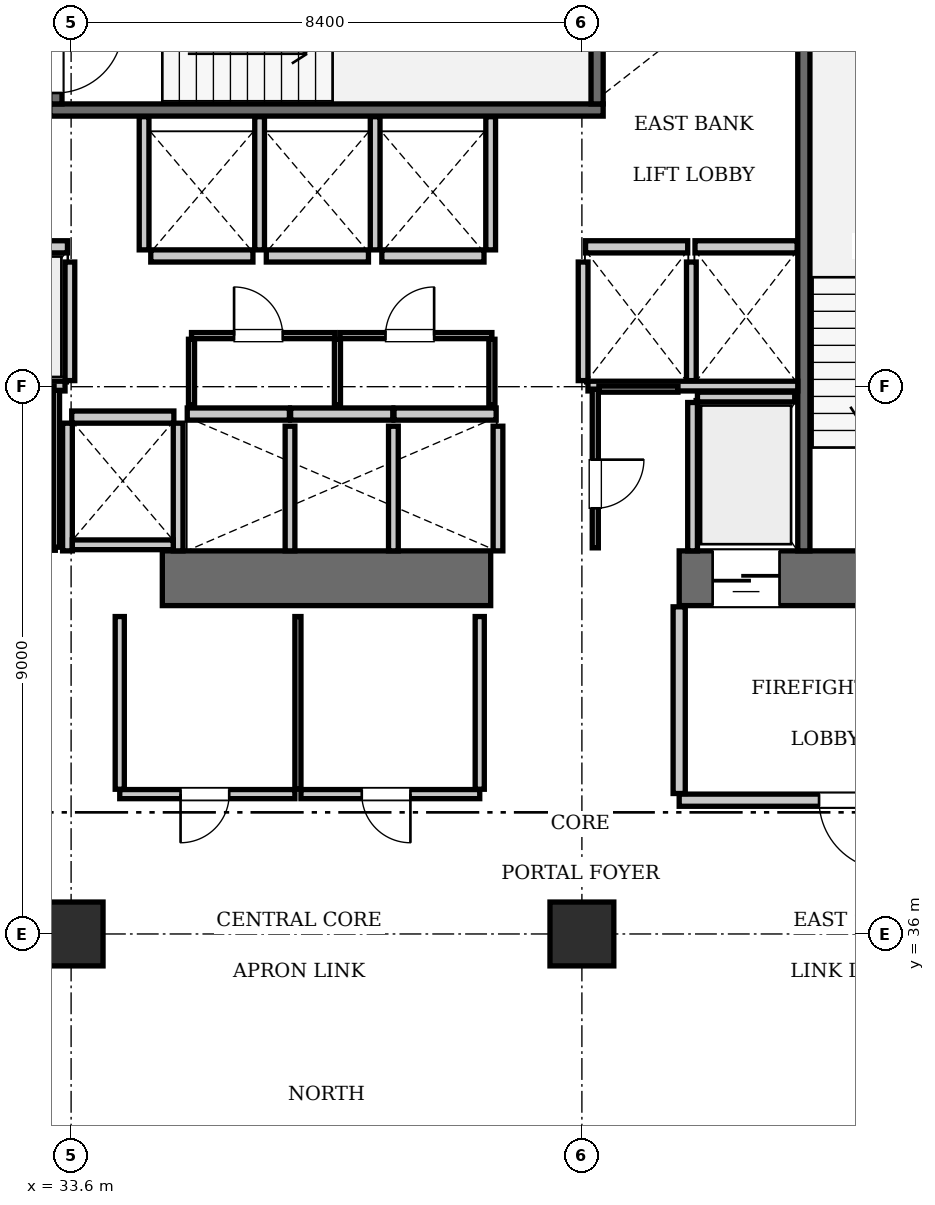
"""IFC4 building model, lengths in metres.
Left out: names, types, materials, properties, quantities, classifications, styles, units other than length and angle.
Written with IfcOpenShell. Run it as: python <this file> out.ifc"""

import sys

from ifc_helpers import new_model, si_unit, direction, frame, frame_2d, origin, origin_2d, place, context, subcontext, project, spatial, rectangle, extrude, element, fill, save


model = new_model("IFC4")
c1 = context("Model", 3, precision=1e-05, world=origin(), true_north=direction((0.0, 1.0)))
c2 = subcontext(c1, "Body", "Model", "MODEL_VIEW")
j1 = project(units=[si_unit("LENGTHUNIT", "METRE"), si_unit("PLANEANGLEUNIT", "RADIAN")], contexts=[c1])
p1 = place(None, origin())
s1 = spatial("IfcSite", under=j1, at=p1, CompositionType="ELEMENT")
p2 = place(p1, origin())
s2 = spatial("IfcBuilding", under=s1, at=p2, CompositionType="ELEMENT")
p3 = place(p2, frame((0.0, 0.0, 84.7)))
s3 = spatial("IfcBuildingStorey", under=s2, at=p3, CompositionType="ELEMENT", Elevation=84.7)
p4 = place(p3, frame((35.1, 41.85, 0.0), z_axis=(0.0, 0.0, 1.0), x_axis=(1.0, 0.0, 0.0)))
e1 = element("IfcWall", 1, at=p4, inside=s3, PredefinedType="SHEAR", context=c2, shape_type="SweptSolid", body=[
    extrude(rectangle(XDim=5.4, YDim=0.9, at=frame_2d((2.7, 0.0))), origin(), (0.0, 0.0, 1.0), 3.85),
])
p5 = place(p3, frame((43.6, 41.85, 0.0), z_axis=(0.0, 0.0, 1.0), x_axis=(1.0, 0.0, 0.0)))
e2 = element("IfcWall", 2, at=p5, inside=s3, PredefinedType="SHEAR", context=c2, shape_type="SweptSolid", body=[
    extrude(rectangle(XDim=6.8, YDim=0.9, at=frame_2d((3.4, 0.0))), origin(), (0.0, 0.0, 1.0), 3.85),
])
p6 = place(p5, frame((3.9, 0.0, 0.0)))
e3 = element("IfcOpeningElement", 3, at=p6, cuts=e2, PredefinedType="OPENING", context=c2, shape_type="SweptSolid", body=[
    extrude(rectangle(XDim=1.15, YDim=2.15, at=frame_2d((0.575, 1.075))), frame((0.0, 0.46, 0.0), z_axis=(0.0, -1.0, 0.0), x_axis=(1.0, 0.0, 0.0)), (0.0, 0.0, 1.0), 0.92),
])
p7 = place(p5, frame((0.55, 0.0, 0.0)))
e4 = element("IfcOpeningElement", 4, at=p7, cuts=e2, PredefinedType="OPENING", context=c2, shape_type="SweptSolid", body=[
    extrude(rectangle(XDim=1.1, YDim=2.2, at=frame_2d((0.55, 1.1))), frame((0.0, 0.46, 0.0), z_axis=(0.0, -1.0, 0.0), x_axis=(1.0, 0.0, 0.0)), (0.0, 0.0, 1.0), 0.92),
])
for number, where, z_axis, x_axis in (
    (5, (33.6, 36.0, 0.0), (0.0, 0.0, 1.0), (1.0, 0.0, 0.0)),
    (6, (42.0, 36.0, 0.0), (0.0, 0.0, 1.0), (1.0, 0.0, 0.0)),
):
    element("IfcColumn", number, at=place(p3, frame(where, z_axis=z_axis, x_axis=x_axis)), inside=s3, PredefinedType="COLUMN", context=c2, shape_type="SweptSolid", body=[
        extrude(rectangle(XDim=1.05, YDim=1.05, at=origin_2d()), origin(), (0.0, 0.0, 1.0), 3.85),
    ])
p8 = place(p3, frame((33.25, 49.55, 0.0), z_axis=(0.0, 0.0, 1.0), x_axis=(1.0, 0.0, 0.0)))
e7 = element("IfcWall", 7, at=p8, inside=s3, PredefinedType="SOLIDWALL", context=c2, shape_type="SweptSolid", body=[
    extrude(rectangle(XDim=9.1, YDim=0.2, at=frame_2d((4.55, 0.0))), origin(), (0.0, 0.0, 1.0), 3.61),
])
p9 = place(p3, frame((42.25, 49.65, 0.0), z_axis=(0.0, 0.0, 1.0), x_axis=(0.0, 1.0, 0.0)))
e8 = element("IfcWall", 8, at=p9, inside=s3, PredefinedType="SOLIDWALL", context=c2, shape_type="SweptSolid", body=[
    extrude(rectangle(XDim=3.45, YDim=0.2, at=frame_2d((1.725, 0.0))), origin(), (0.0, 0.0, 1.0), 3.61),
])
p10 = place(p3, frame((33.35, 49.65, 0.0), z_axis=(0.0, 0.0, 1.0), x_axis=(0.0, 1.0, 0.0)))
e9 = element("IfcWall", 9, at=p10, inside=s3, PredefinedType="SOLIDWALL", context=c2, shape_type="SweptSolid", body=[
    extrude(rectangle(XDim=3.45, YDim=0.2, at=frame_2d((1.725, 0.0))), origin(), (0.0, 0.0, 1.0), 3.61),
])
p11 = place(p10, frame((0.18, 0.0, 0.0)))
e10 = element("IfcOpeningElement", 10, at=p11, cuts=e9, PredefinedType="OPENING", context=c2, shape_type="SweptSolid", body=[
    extrude(rectangle(XDim=1.1, YDim=2.15, at=frame_2d((0.55, 1.075))), frame((0.0, 0.11, 0.0), z_axis=(0.0, -1.0, 0.0), x_axis=(1.0, 0.0, 0.0)), (0.0, 0.0, 1.0), 0.22),
])
p12 = place(p3, frame((45.65, 42.3, 0.0), z_axis=(0.0, 0.0, 1.0), x_axis=(0.0, 1.0, 0.0)))
e11 = element("IfcWall", 11, at=p12, inside=s3, PredefinedType="SOLIDWALL", context=c2, shape_type="SweptSolid", body=[
    extrude(rectangle(XDim=8.85, YDim=0.2, at=frame_2d((4.425, 0.0))), origin(), (0.0, 0.0, 1.0), 3.61),
])
p13 = place(p3, frame((31.86, 47.3, 0.0), z_axis=(0.0, 0.0, 1.0), x_axis=(1.0, 0.0, 0.0)))
e12 = element("IfcWall", 12, at=p13, inside=s3, PredefinedType="SOLIDWALL", context=c2, shape_type="SweptSolid", body=[
    extrude(rectangle(XDim=1.68, YDim=0.2, at=frame_2d((0.84, 0.0))), origin(), (0.0, 0.0, 1.0), 3.61),
])
p14 = place(p13, frame((0.34, 0.0, 0.0)))
e13 = element("IfcOpeningElement", 13, at=p14, cuts=e12, PredefinedType="OPENING", context=c2, shape_type="SweptSolid", body=[
    extrude(rectangle(XDim=1.0, YDim=2.15, at=frame_2d((0.5, 1.075))), frame((0.0, 0.11, 0.0), z_axis=(0.0, -1.0, 0.0), x_axis=(1.0, 0.0, 0.0)), (0.0, 0.0, 1.0), 0.22),
])
for number, where, z_axis, x_axis in (
    (14, (42.06, 47.3, 0.0), (0.0, 0.0, 1.0), (1.0, 0.0, 0.0)),
    (15, (43.86, 47.3, 0.0), (0.0, 0.0, 1.0), (1.0, 0.0, 0.0)),
    (16, (35.51, 44.55, 0.0), (0.0, 0.0, 1.0), (1.0, 0.0, 0.0)),
    (17, (37.21, 44.55, 0.0), (0.0, 0.0, 1.0), (1.0, 0.0, 0.0)),
):
    element("IfcWall", number, at=place(p3, frame(where, z_axis=z_axis, x_axis=x_axis)), inside=s3, PredefinedType="SOLIDWALL", context=c2, shape_type="SweptSolid", body=[
        extrude(rectangle(XDim=1.68, YDim=0.2, at=frame_2d((0.84, 0.0))), origin(), (0.0, 0.0, 1.0), 3.61),
    ])
for number, where, z_axis, x_axis in (
    (18, (38.91, 44.55, 0.0), (0.0, 0.0, 1.0), (1.0, 0.0, 0.0)),
    (19, (34.91, 47.15, 0.0), (0.0, 0.0, 1.0), (1.0, 0.0, 0.0)),
):
    element("IfcWall", number, at=place(p3, frame(where, z_axis=z_axis, x_axis=x_axis)), inside=s3, PredefinedType="SOLIDWALL", context=c2, shape_type="SweptSolid", body=[
        extrude(rectangle(XDim=1.68, YDim=0.2, at=frame_2d((0.84, 0.0))), origin(), (0.0, 0.0, 1.0), 3.61),
    ])
for number, where, z_axis, x_axis in (
    (20, (36.81, 47.15, 0.0), (0.0, 0.0, 1.0), (1.0, 0.0, 0.0)),
    (21, (38.71, 47.15, 0.0), (0.0, 0.0, 1.0), (1.0, 0.0, 0.0)),
    (22, (33.61, 44.5, 0.0), (0.0, 0.0, 1.0), (1.0, 0.0, 0.0)),
):
    element("IfcWall", number, at=place(p3, frame(where, z_axis=z_axis, x_axis=x_axis)), inside=s3, PredefinedType="SOLIDWALL", context=c2, shape_type="SweptSolid", body=[
        extrude(rectangle(XDim=1.68, YDim=0.2, at=frame_2d((0.84, 0.0))), origin(), (0.0, 0.0, 1.0), 3.61),
    ])
p15 = place(p3, frame((43.9, 44.83, 0.0), z_axis=(0.0, 0.0, 1.0), x_axis=(1.0, 0.0, 0.0)))
e23 = element("IfcWall", 23, at=p15, inside=s3, PredefinedType="SOLIDWALL", context=c2, shape_type="SweptSolid", body=[
    extrude(rectangle(XDim=1.6, YDim=0.16, at=frame_2d((0.8, 0.0))), origin(), (0.0, 0.0, 1.0), 3.61),
])
p16 = place(p3, frame((43.82, 42.3, 0.0), z_axis=(0.0, 0.0, 1.0), x_axis=(0.0, 1.0, 0.0)))
e24 = element("IfcWall", 24, at=p16, inside=s3, PredefinedType="SOLIDWALL", context=c2, shape_type="SweptSolid", body=[
    extrude(rectangle(XDim=2.44, YDim=0.16, at=frame_2d((1.22, 0.0))), origin(), (0.0, 0.0, 1.0), 3.61),
])
p17 = place(p3, frame((33.58, 45.1, 0.0), z_axis=(0.0, 0.0, 1.0), x_axis=(0.0, 1.0, 0.0)))
e25 = element("IfcWall", 25, at=p17, inside=s3, PredefinedType="SOLIDWALL", context=c2, shape_type="SweptSolid", body=[
    extrude(rectangle(XDim=1.95, YDim=0.16, at=frame_2d((0.975, 0.0))), origin(), (0.0, 0.0, 1.0), 3.61),
])
p18 = place(p3, frame((30.05, 45.01, 0.0), z_axis=(0.0, 0.0, 1.0), x_axis=(1.0, 0.0, 0.0)))
e26 = element("IfcWall", 26, at=p18, inside=s3, PredefinedType="SOLIDWALL", context=c2, shape_type="SweptSolid", body=[
    extrude(rectangle(XDim=3.45, YDim=0.16, at=frame_2d((1.725, 0.0))), origin(), (0.0, 0.0, 1.0), 3.61),
])
for number, where, z_axis, x_axis in (
    (27, (42.02, 45.1, 0.0), (0.0, 0.0, 1.0), (0.0, 1.0, 0.0)),
    (28, (43.8, 45.1, 0.0), (0.0, 0.0, 1.0), (0.0, 1.0, 0.0)),
):
    element("IfcWall", number, at=place(p3, frame(where, z_axis=z_axis, x_axis=x_axis)), inside=s3, PredefinedType="SOLIDWALL", context=c2, shape_type="SweptSolid", body=[
        extrude(rectangle(XDim=1.95, YDim=0.16, at=frame_2d((0.975, 0.0))), origin(), (0.0, 0.0, 1.0), 3.61),
    ])
p19 = place(p3, frame((42.1, 45.01, 0.0), z_axis=(0.0, 0.0, 1.0), x_axis=(1.0, 0.0, 0.0)))
e29 = element("IfcWall", 29, at=p19, inside=s3, PredefinedType="SOLIDWALL", context=c2, shape_type="SweptSolid", body=[
    extrude(rectangle(XDim=3.45, YDim=0.16, at=frame_2d((1.725, 0.0))), origin(), (0.0, 0.0, 1.0), 3.61),
])
for number, where, z_axis, x_axis in (
    (30, (37.2, 42.3, 0.0), (0.0, 0.0, 1.0), (0.0, 1.0, 0.0)),
    (31, (38.9, 42.3, 0.0), (0.0, 0.0, 1.0), (0.0, 1.0, 0.0)),
    (32, (40.62, 42.3, 0.0), (0.0, 0.0, 1.0), (0.0, 1.0, 0.0)),
):
    element("IfcWall", number, at=place(p3, frame(where, z_axis=z_axis, x_axis=x_axis)), inside=s3, PredefinedType="SOLIDWALL", context=c2, shape_type="SweptSolid", body=[
        extrude(rectangle(XDim=2.05, YDim=0.16, at=frame_2d((1.025, 0.0))), origin(), (0.0, 0.0, 1.0), 3.61),
    ])
for number, where, z_axis, x_axis in (
    (33, (34.8, 47.25, 0.0), (0.0, 0.0, 1.0), (0.0, 1.0, 0.0)),
    (34, (36.7, 47.25, 0.0), (0.0, 0.0, 1.0), (0.0, 1.0, 0.0)),
    (35, (38.6, 47.25, 0.0), (0.0, 0.0, 1.0), (0.0, 1.0, 0.0)),
    (36, (40.5, 47.25, 0.0), (0.0, 0.0, 1.0), (0.0, 1.0, 0.0)),
):
    element("IfcWall", number, at=place(p3, frame(where, z_axis=z_axis, x_axis=x_axis)), inside=s3, PredefinedType="SOLIDWALL", context=c2, shape_type="SweptSolid", body=[
        extrude(rectangle(XDim=2.19, YDim=0.16, at=frame_2d((1.095, 0.0))), origin(), (0.0, 0.0, 1.0), 3.61),
    ])
for number, where, z_axis, x_axis in (
    (37, (33.54, 42.3, 0.0), (0.0, 0.0, 1.0), (0.0, 1.0, 0.0)),
    (38, (35.36, 42.3, 0.0), (0.0, 0.0, 1.0), (0.0, 1.0, 0.0)),
):
    element("IfcWall", number, at=place(p3, frame(where, z_axis=z_axis, x_axis=x_axis)), inside=s3, PredefinedType="SOLIDWALL", context=c2, shape_type="SweptSolid", body=[
        extrude(rectangle(XDim=2.1, YDim=0.16, at=frame_2d((1.05, 0.0))), origin(), (0.0, 0.0, 1.0), 3.61),
    ])
p20 = place(p3, frame((33.62, 42.4, 0.0), z_axis=(0.0, 0.0, 1.0), x_axis=(1.0, 0.0, 0.0)))
e39 = element("IfcWall", 39, at=p20, inside=s3, PredefinedType="SOLIDWALL", context=c2, shape_type="SweptSolid", body=[
    extrude(rectangle(XDim=1.66, YDim=0.16, at=frame_2d((0.83, 0.0))), origin(), (0.0, 0.0, 1.0), 3.61),
])
p21 = place(p3, frame((43.6, 38.2, 0.0), z_axis=(0.0, 0.0, 1.0), x_axis=(1.0, 0.0, 0.0)))
e40 = element("IfcWall", 40, at=p21, inside=s3, PredefinedType="PARTITIONING", context=c2, shape_type="SweptSolid", body=[
    extrude(rectangle(XDim=5.8, YDim=0.2, at=frame_2d((2.9, 0.0))), origin(), (0.0, 0.0, 1.0), 3.61),
])
p22 = place(p21, frame((2.3, 0.0, 0.0)))
e41 = element("IfcOpeningElement", 41, at=p22, cuts=e40, PredefinedType="OPENING", context=c2, shape_type="SweptSolid", body=[
    extrude(rectangle(XDim=1.15, YDim=2.15, at=frame_2d((0.575, 1.075))), frame((0.0, 0.11, 0.0), z_axis=(0.0, -1.0, 0.0), x_axis=(1.0, 0.0, 0.0)), (0.0, 0.0, 1.0), 0.22),
])
p23 = place(p3, frame((43.6, 38.31, 0.0), z_axis=(0.0, 0.0, 1.0), x_axis=(0.0, 1.0, 0.0)))
e42 = element("IfcWall", 42, at=p23, inside=s3, PredefinedType="PARTITIONING", context=c2, shape_type="SweptSolid", body=[
    extrude(rectangle(XDim=3.07, YDim=0.2, at=frame_2d((1.535, 0.0))), origin(), (0.0, 0.0, 1.0), 3.61),
])
p24 = place(p3, frame((32.02, 42.36, 0.0), z_axis=(0.0, 0.0, 1.0), x_axis=(1.0, 0.0, 0.0)))
e43 = element("IfcWall", 43, at=p24, inside=s3, PredefinedType="PARTITIONING", context=c2, shape_type="SweptSolid", body=[
    extrude(rectangle(XDim=1.32, YDim=0.1, at=frame_2d((0.66, 0.0))), origin(), (0.0, 0.0, 1.0), 3.61),
])
p25 = place(p24, frame((0.24, 0.0, 0.0)))
e44 = element("IfcOpeningElement", 44, at=p25, cuts=e43, PredefinedType="OPENING", context=c2, shape_type="SweptSolid", body=[
    extrude(rectangle(XDim=0.8, YDim=2.05, at=frame_2d((0.4, 1.025))), frame((0.0, 0.06, 0.0), z_axis=(0.0, -1.0, 0.0), x_axis=(1.0, 0.0, 0.0)), (0.0, 0.0, 1.0), 0.12),
])
p26 = place(p3, frame((31.84, 44.96, 0.0), z_axis=(0.0, 0.0, 1.0), x_axis=(1.0, 0.0, 0.0)))
e45 = element("IfcWall", 45, at=p26, inside=s3, PredefinedType="PARTITIONING", context=c2, shape_type="SweptSolid", body=[
    extrude(rectangle(XDim=1.48, YDim=0.1, at=frame_2d((0.74, 0.0))), origin(), (0.0, 0.0, 1.0), 3.61),
])
p27 = place(p3, frame((33.36, 42.36, 0.0), z_axis=(0.0, 0.0, 1.0), x_axis=(0.0, 1.0, 0.0)))
e46 = element("IfcWall", 46, at=p27, inside=s3, PredefinedType="PARTITIONING", context=c2, shape_type="SweptSolid", body=[
    extrude(rectangle(XDim=2.58, YDim=0.1, at=frame_2d((1.29, 0.0))), origin(), (0.0, 0.0, 1.0), 3.61),
])
p28 = place(p3, frame((35.58, 45.84, 0.0), z_axis=(0.0, 0.0, 1.0), x_axis=(1.0, 0.0, 0.0)))
e47 = element("IfcWall", 47, at=p28, inside=s3, PredefinedType="PARTITIONING", context=c2, shape_type="SweptSolid", body=[
    extrude(rectangle(XDim=2.36, YDim=0.1, at=frame_2d((1.18, 0.0))), origin(), (0.0, 0.0, 1.0), 3.61),
])
p29 = place(p28, frame((0.7, 0.0, 0.0)))
e48 = element("IfcOpeningElement", 48, at=p29, cuts=e47, PredefinedType="OPENING", context=c2, shape_type="SweptSolid", body=[
    extrude(rectangle(XDim=0.8, YDim=2.05, at=frame_2d((0.4, 1.025))), frame((0.0, 0.06, 0.0), z_axis=(0.0, -1.0, 0.0), x_axis=(1.0, 0.0, 0.0)), (0.0, 0.0, 1.0), 0.12),
])
p30 = place(p3, frame((38.02, 45.84, 0.0), z_axis=(0.0, 0.0, 1.0), x_axis=(1.0, 0.0, 0.0)))
e49 = element("IfcWall", 49, at=p30, inside=s3, PredefinedType="PARTITIONING", context=c2, shape_type="SweptSolid", body=[
    extrude(rectangle(XDim=2.5, YDim=0.1, at=frame_2d((1.25, 0.0))), origin(), (0.0, 0.0, 1.0), 3.61),
])
p31 = place(p30, frame((0.75, 0.0, 0.0)))
e50 = element("IfcOpeningElement", 50, at=p31, cuts=e49, PredefinedType="OPENING", context=c2, shape_type="SweptSolid", body=[
    extrude(rectangle(XDim=0.8, YDim=2.05, at=frame_2d((0.4, 1.025))), frame((0.0, 0.06, 0.0), z_axis=(0.0, -1.0, 0.0), x_axis=(1.0, 0.0, 0.0)), (0.0, 0.0, 1.0), 0.12),
])
for number, where, z_axis, x_axis in (
    (51, (35.58, 44.7, 0.0), (0.0, 0.0, 1.0), (0.0, 1.0, 0.0)),
    (52, (37.98, 44.7, 0.0), (0.0, 0.0, 1.0), (0.0, 1.0, 0.0)),
    (53, (40.52, 44.7, 0.0), (0.0, 0.0, 1.0), (0.0, 1.0, 0.0)),
):
    element("IfcWall", number, at=place(p3, frame(where, z_axis=z_axis, x_axis=x_axis)), inside=s3, PredefinedType="PARTITIONING", context=c2, shape_type="SweptSolid", body=[
        extrude(rectangle(XDim=1.08, YDim=0.1, at=frame_2d((0.54, 0.0))), origin(), (0.0, 0.0, 1.0), 3.61),
    ])
p32 = place(p3, frame((42.22, 42.35, 0.0), z_axis=(0.0, 0.0, 1.0), x_axis=(0.0, 1.0, 0.0)))
e54 = element("IfcWall", 54, at=p32, inside=s3, PredefinedType="PARTITIONING", context=c2, shape_type="SweptSolid", body=[
    extrude(rectangle(XDim=2.61, YDim=0.1, at=frame_2d((1.305, 0.0))), origin(), (0.0, 0.0, 1.0), 3.61),
])
p33 = place(p32, frame((0.65, 0.0, 0.0)))
e55 = element("IfcOpeningElement", 55, at=p33, cuts=e54, PredefinedType="OPENING", context=c2, shape_type="SweptSolid", body=[
    extrude(rectangle(XDim=0.8, YDim=2.05, at=frame_2d((0.4, 1.025))), frame((0.0, 0.06, 0.0), z_axis=(0.0, -1.0, 0.0), x_axis=(1.0, 0.0, 0.0)), (0.0, 0.0, 1.0), 0.12),
])
p34 = place(p3, frame((42.28, 44.96, 0.0), z_axis=(0.0, 0.0, 1.0), x_axis=(1.0, 0.0, 0.0)))
e56 = element("IfcWall", 56, at=p34, inside=s3, PredefinedType="PARTITIONING", context=c2, shape_type="SweptSolid", body=[
    extrude(rectangle(XDim=1.3, YDim=0.1, at=frame_2d((0.65, 0.0))), origin(), (0.0, 0.0, 1.0), 3.61),
])
p35 = place(p3, frame((34.4, 38.3, 0.0), z_axis=(0.0, 0.0, 1.0), x_axis=(1.0, 0.0, 0.0)))
e57 = element("IfcWall", 57, at=p35, inside=s3, PredefinedType="PARTITIONING", context=c2, shape_type="SweptSolid", body=[
    extrude(rectangle(XDim=2.88, YDim=0.15, at=frame_2d((1.44, 0.0))), origin(), (0.0, 0.0, 1.0), 3.61),
])
p36 = place(p35, frame((1.0, 0.0, 0.0)))
e58 = element("IfcOpeningElement", 58, at=p36, cuts=e57, PredefinedType="OPENING", context=c2, shape_type="SweptSolid", body=[
    extrude(rectangle(XDim=0.8, YDim=2.05, at=frame_2d((0.4, 1.025))), frame((0.0, 0.085, 0.0), z_axis=(0.0, -1.0, 0.0), x_axis=(1.0, 0.0, 0.0)), (0.0, 0.0, 1.0), 0.17),
])
p37 = place(p3, frame((37.38, 38.3, 0.0), z_axis=(0.0, 0.0, 1.0), x_axis=(1.0, 0.0, 0.0)))
e59 = element("IfcWall", 59, at=p37, inside=s3, PredefinedType="PARTITIONING", context=c2, shape_type="SweptSolid", body=[
    extrude(rectangle(XDim=2.94, YDim=0.15, at=frame_2d((1.47, 0.0))), origin(), (0.0, 0.0, 1.0), 3.61),
])
p38 = place(p37, frame((1.0, 0.0, 0.0)))
e60 = element("IfcOpeningElement", 60, at=p38, cuts=e59, PredefinedType="OPENING", context=c2, shape_type="SweptSolid", body=[
    extrude(rectangle(XDim=0.8, YDim=2.05, at=frame_2d((0.4, 1.025))), frame((0.0, 0.085, 0.0), z_axis=(0.0, -1.0, 0.0), x_axis=(1.0, 0.0, 0.0)), (0.0, 0.0, 1.0), 0.17),
])
p39 = place(p3, frame((34.4, 38.38, 0.0), z_axis=(0.0, 0.0, 1.0), x_axis=(0.0, 1.0, 0.0)))
e61 = element("IfcWall", 61, at=p39, inside=s3, PredefinedType="PARTITIONING", context=c2, shape_type="SweptSolid", body=[
    extrude(rectangle(XDim=2.84, YDim=0.15, at=frame_2d((1.42, 0.0))), origin(), (0.0, 0.0, 1.0), 3.61),
])
p40 = place(p3, frame((37.33, 38.38, 0.0), z_axis=(0.0, 0.0, 1.0), x_axis=(0.0, 1.0, 0.0)))
e62 = element("IfcWall", 62, at=p40, inside=s3, PredefinedType="PARTITIONING", context=c2, shape_type="SweptSolid", body=[
    extrude(rectangle(XDim=2.84, YDim=0.1, at=frame_2d((1.42, 0.0))), origin(), (0.0, 0.0, 1.0), 3.61),
])
p41 = place(p3, frame((40.32, 38.38, 0.0), z_axis=(0.0, 0.0, 1.0), x_axis=(0.0, 1.0, 0.0)))
e63 = element("IfcWall", 63, at=p41, inside=s3, PredefinedType="PARTITIONING", context=c2, shape_type="SweptSolid", body=[
    extrude(rectangle(XDim=2.84, YDim=0.15, at=frame_2d((1.42, 0.0))), origin(), (0.0, 0.0, 1.0), 3.61),
])
p42 = place(p11, frame((1.1, 0.0, 0.0), z_axis=(0.0, 0.0, 1.0), x_axis=(-1.0, 0.0, 0.0)))
e64 = element("IfcDoor", 64, at=p42, inside=s3, OperationType="SINGLE_SWING_LEFT", PredefinedType="DOOR", context=c2, shape_type="SweptSolid", body=[
    extrude(rectangle(XDim=1.1, YDim=2.15, at=frame_2d((0.55, 1.075))), frame((0.0, 0.025, 0.0), z_axis=(0.0, -1.0, 0.0), x_axis=(1.0, 0.0, 0.0)), (0.0, 0.0, 1.0), 0.05),
])
fill(e10, e64)
p43 = place(p7, frame((1.1, 0.0, 0.0), z_axis=(0.0, 0.0, 1.0), x_axis=(-1.0, 0.0, 0.0)))
e65 = element("IfcDoor", 65, at=p43, inside=s3, OperationType="SLIDING_TO_LEFT", PredefinedType="DOOR", context=c2, shape_type="SweptSolid", body=[
    extrude(rectangle(XDim=1.1, YDim=2.2, at=frame_2d((0.55, 1.1))), frame((0.0, 0.025, 0.0), z_axis=(0.0, -1.0, 0.0), x_axis=(1.0, 0.0, 0.0)), (0.0, 0.0, 1.0), 0.05),
])
fill(e4, e65)
p44 = place(p22, frame((1.15, 0.0, 0.0), z_axis=(0.0, 0.0, 1.0), x_axis=(-1.0, 0.0, 0.0)))
e66 = element("IfcDoor", 66, at=p44, inside=s3, OperationType="SINGLE_SWING_LEFT", PredefinedType="DOOR", context=c2, shape_type="SweptSolid", body=[
    extrude(rectangle(XDim=1.15, YDim=2.15, at=frame_2d((0.575, 1.075))), frame((0.0, 0.025, 0.0), z_axis=(0.0, -1.0, 0.0), x_axis=(1.0, 0.0, 0.0)), (0.0, 0.0, 1.0), 0.05),
])
fill(e41, e66)
p45 = place(p29, origin())
e67 = element("IfcDoor", 67, at=p45, inside=s3, OperationType="SINGLE_SWING_LEFT", PredefinedType="DOOR", context=c2, shape_type="SweptSolid", body=[
    extrude(rectangle(XDim=0.8, YDim=2.05, at=frame_2d((0.4, 1.025))), frame((0.0, 0.025, 0.0), z_axis=(0.0, -1.0, 0.0), x_axis=(1.0, 0.0, 0.0)), (0.0, 0.0, 1.0), 0.05),
])
fill(e48, e67)
p46 = place(p31, origin())
e68 = element("IfcDoor", 68, at=p46, inside=s3, OperationType="SINGLE_SWING_RIGHT", PredefinedType="DOOR", context=c2, shape_type="SweptSolid", body=[
    extrude(rectangle(XDim=0.8, YDim=2.05, at=frame_2d((0.4, 1.025))), frame((0.0, 0.025, 0.0), z_axis=(0.0, -1.0, 0.0), x_axis=(1.0, 0.0, 0.0)), (0.0, 0.0, 1.0), 0.05),
])
fill(e50, e68)
p47 = place(p33, frame((0.8, 0.0, 0.0), z_axis=(0.0, 0.0, 1.0), x_axis=(-1.0, 0.0, 0.0)))
e69 = element("IfcDoor", 69, at=p47, inside=s3, OperationType="SINGLE_SWING_LEFT", PredefinedType="DOOR", context=c2, shape_type="SweptSolid", body=[
    extrude(rectangle(XDim=0.8, YDim=2.05, at=frame_2d((0.4, 1.025))), frame((0.0, 0.025, 0.0), z_axis=(0.0, -1.0, 0.0), x_axis=(1.0, 0.0, 0.0)), (0.0, 0.0, 1.0), 0.05),
])
fill(e55, e69)
p48 = place(p36, frame((0.8, 0.0, 0.0), z_axis=(0.0, 0.0, 1.0), x_axis=(-1.0, 0.0, 0.0)))
e70 = element("IfcDoor", 70, at=p48, inside=s3, OperationType="SINGLE_SWING_RIGHT", PredefinedType="DOOR", context=c2, shape_type="SweptSolid", body=[
    extrude(rectangle(XDim=0.8, YDim=2.05, at=frame_2d((0.4, 1.025))), frame((0.0, 0.025, 0.0), z_axis=(0.0, -1.0, 0.0), x_axis=(1.0, 0.0, 0.0)), (0.0, 0.0, 1.0), 0.05),
])
fill(e58, e70)
p49 = place(p38, frame((0.8, 0.0, 0.0), z_axis=(0.0, 0.0, 1.0), x_axis=(-1.0, 0.0, 0.0)))
e71 = element("IfcDoor", 71, at=p49, inside=s3, OperationType="SINGLE_SWING_LEFT", PredefinedType="DOOR", context=c2, shape_type="SweptSolid", body=[
    extrude(rectangle(XDim=0.8, YDim=2.05, at=frame_2d((0.4, 1.025))), frame((0.0, 0.025, 0.0), z_axis=(0.0, -1.0, 0.0), x_axis=(1.0, 0.0, 0.0)), (0.0, 0.0, 1.0), 0.05),
])
fill(e60, e71)
save(model, sys.argv[1])
